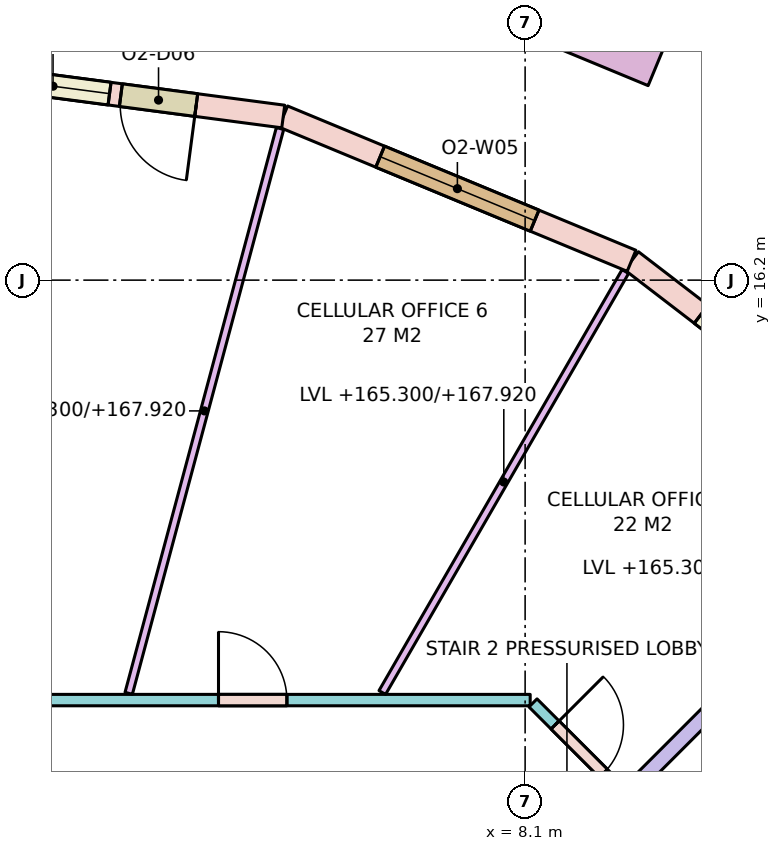
"""IFC4 building model, lengths in metres.
Left out: names, types, materials, properties, quantities, classifications, styles, units other than length and angle.
Written with IfcOpenShell. Run it as: python <this file> out.ifc"""

import sys

from ifc_helpers import new_model, si_unit, direction, frame, frame_2d, origin, place, context, subcontext, project, spatial, rectangle, extrude, element, fill, save


model = new_model("IFC4")
c1 = context("Model", 3, precision=1e-05, world=origin(), true_north=direction((0.0, 1.0)))
c2 = subcontext(c1, "Body", "Model", "MODEL_VIEW")
j1 = project(units=[si_unit("LENGTHUNIT", "METRE"), si_unit("PLANEANGLEUNIT", "RADIAN")], contexts=[c1])
p1 = place(None, origin())
s1 = spatial("IfcSite", under=j1, at=p1, CompositionType="ELEMENT")
p2 = place(p1, origin())
s2 = spatial("IfcBuilding", under=s1, at=p2, CompositionType="ELEMENT")
p3 = place(p2, frame((0.0, 0.0, 165.3)))
s3 = spatial("IfcBuildingStorey", under=s2, at=p3, CompositionType="ELEMENT", Elevation=165.3)
p4 = place(p3, frame((13.435, 13.435, 0.0), z_axis=(0.0, 0.0, 1.0), x_axis=(-0.793348024649, 0.608768356425, 0.0)))
e1 = element("IfcWall", 1, at=p4, inside=s3, PredefinedType="STANDARD", context=c2, shape_type="SweptSolid", body=[
    extrude(rectangle(XDim=4.96, YDim=0.3, at=frame_2d((2.48, 0.0))), origin(), (0.0, 0.0, 1.0), 3.42),
])
p5 = place(p4, frame((1.155, 0.0, 0.0)))
e2 = element("IfcOpeningElement", 2, at=p5, cuts=e1, PredefinedType="OPENING", context=c2, shape_type="SweptSolid", body=[
    extrude(rectangle(XDim=1.0, YDim=2.4, at=frame_2d((0.5, 1.2))), frame((0.0, 0.16, 0.0), z_axis=(0.0, -1.0, 0.0), x_axis=(1.0, 0.0, 0.0)), (0.0, 0.0, 1.0), 0.32),
])
p6 = place(p4, frame((2.305, 0.0, 0.8)))
e3 = element("IfcOpeningElement", 3, at=p6, cuts=e1, PredefinedType="OPENING", context=c2, shape_type="SweptSolid", body=[
    extrude(rectangle(XDim=1.5, YDim=2.4, at=frame_2d((0.75, 1.2))), frame((0.0, 0.16, 0.0), z_axis=(0.0, -1.0, 0.0), x_axis=(1.0, 0.0, 0.0)), (0.0, 0.0, 1.0), 0.32),
])
p7 = place(p3, frame((9.5, 16.455, 0.0), z_axis=(0.0, 0.0, 1.0), x_axis=(-0.923893254961, 0.382650301762, 0.0)))
e4 = element("IfcWall", 4, at=p7, inside=s3, PredefinedType="STANDARD", context=c2, shape_type="SweptSolid", body=[
    extrude(rectangle(XDim=4.96, YDim=0.3, at=frame_2d((2.48, 0.0))), origin(), (0.0, 0.0, 1.0), 3.42),
])
p8 = place(p7, frame((1.38, 0.0, 0.8)))
e5 = element("IfcOpeningElement", 5, at=p8, cuts=e4, PredefinedType="OPENING", context=c2, shape_type="SweptSolid", body=[
    extrude(rectangle(XDim=2.2, YDim=2.4, at=frame_2d((1.1, 1.2))), frame((0.0, 0.16, 0.0), z_axis=(0.0, -1.0, 0.0), x_axis=(1.0, 0.0, 0.0)), (0.0, 0.0, 1.0), 0.32),
])
p9 = place(p3, frame((4.917, 18.353, 0.0), z_axis=(0.0, 0.0, 1.0), x_axis=(-0.991443234469, 0.130538549191, 0.0)))
e6 = element("IfcWall", 6, at=p9, inside=s3, PredefinedType="STANDARD", context=c2, shape_type="SweptSolid", body=[
    extrude(rectangle(XDim=4.96, YDim=0.3, at=frame_2d((2.48, 0.0))), origin(), (0.0, 0.0, 1.0), 3.42),
])
p10 = place(p9, frame((1.155, 0.0, 0.0)))
e7 = element("IfcOpeningElement", 7, at=p10, cuts=e6, PredefinedType="OPENING", context=c2, shape_type="SweptSolid", body=[
    extrude(rectangle(XDim=1.0, YDim=2.4, at=frame_2d((0.5, 1.2))), frame((0.0, 0.16, 0.0), z_axis=(0.0, -1.0, 0.0), x_axis=(1.0, 0.0, 0.0)), (0.0, 0.0, 1.0), 0.32),
])
p11 = place(p9, frame((2.305, 0.0, 0.8)))
e8 = element("IfcOpeningElement", 8, at=p11, cuts=e6, PredefinedType="OPENING", context=c2, shape_type="SweptSolid", body=[
    extrude(rectangle(XDim=1.5, YDim=2.4, at=frame_2d((0.75, 1.2))), frame((0.0, 0.16, 0.0), z_axis=(0.0, -1.0, 0.0), x_axis=(1.0, 0.0, 0.0)), (0.0, 0.0, 1.0), 0.32),
])
p12 = place(p3, frame((9.814, 18.99, 0.0), z_axis=(0.0, 0.0, 1.0), x_axis=(-0.923875488976, 0.382693194178, 0.0)))
e9 = element("IfcWall", 9, at=p12, inside=s3, PredefinedType="PARAPET", context=c2, shape_type="SweptSolid", body=[
    extrude(rectangle(XDim=3.6, YDim=0.5, at=frame_2d((1.8, 0.0))), origin(), (0.0, 0.0, 1.0), 0.9),
])
p13 = place(p3, frame((-8.167, 10.675, 0.0), z_axis=(0.0, 0.0, 1.0), x_axis=(1.0, 0.0, 0.0)))
e10 = element("IfcWall", 10, at=p13, inside=s3, PredefinedType="PARTITIONING", context=c2, shape_type="SweptSolid", body=[
    extrude(rectangle(XDim=16.333, YDim=0.15, at=frame_2d((8.167, 0.0))), origin(), (0.0, 0.0, 1.0), 2.62),
])
p14 = place(p13, frame((4.639, 0.0, 0.0)))
e11 = element("IfcOpeningElement", 11, at=p14, cuts=e10, PredefinedType="OPENING", context=c2, shape_type="SweptSolid", body=[
    extrude(rectangle(XDim=1.8, YDim=2.1, at=frame_2d((0.9, 1.05))), frame((0.0, 0.085, 0.0), z_axis=(0.0, -1.0, 0.0), x_axis=(1.0, 0.0, 0.0)), (0.0, 0.0, 1.0), 0.17),
])
p15 = place(p13, frame((12.232, 0.0, 0.0)))
e12 = element("IfcOpeningElement", 12, at=p15, cuts=e10, PredefinedType="OPENING", context=c2, shape_type="SweptSolid", body=[
    extrude(rectangle(XDim=0.9, YDim=2.1, at=frame_2d((0.45, 1.05))), frame((0.0, 0.085, 0.0), z_axis=(0.0, -1.0, 0.0), x_axis=(1.0, 0.0, 0.0)), (0.0, 0.0, 1.0), 0.17),
])
p16 = place(p3, frame((8.204, 10.638, 0.0), z_axis=(0.0, 0.0, 1.0), x_axis=(0.707177693966, -0.707035861295, 0.0)))
e13 = element("IfcWall", 13, at=p16, inside=s3, PredefinedType="PARTITIONING", context=c2, shape_type="SweptSolid", body=[
    extrude(rectangle(XDim=1.721, YDim=0.15, at=frame_2d((0.861, 0.0))), origin(), (0.0, 0.0, 1.0), 2.62),
])
p17 = place(p16, frame((0.411, 0.0, 0.0)))
e14 = element("IfcOpeningElement", 14, at=p17, cuts=e13, PredefinedType="OPENING", context=c2, shape_type="SweptSolid", body=[
    extrude(rectangle(XDim=0.9, YDim=2.1, at=frame_2d((0.45, 1.05))), frame((0.0, 0.085, 0.0), z_axis=(0.0, -1.0, 0.0), x_axis=(1.0, 0.0, 0.0)), (0.0, 0.0, 1.0), 0.17),
])
p18 = place(p3, frame((9.491, 9.491, 0.0), z_axis=(0.0, 0.0, 1.0), x_axis=(0.707106781187, 0.707106781187, 0.0)))
e15 = element("IfcWall", 15, at=p18, inside=s3, PredefinedType="PARTITIONING", context=c2, shape_type="SweptSolid", body=[
    extrude(rectangle(XDim=5.414, YDim=0.2, at=frame_2d((2.707, 0.0))), origin(), (0.0, 0.0, 1.0), 2.62),
])
p19 = place(p3, frame((6.221, 10.775, 0.0), z_axis=(0.0, 0.0, 1.0), x_axis=(0.500023166934, 0.866012027936, 0.0)))
e16 = element("IfcWall", 16, at=p19, inside=s3, PredefinedType="PARTITIONING", context=c2, shape_type="SweptSolid", body=[
    extrude(rectangle(XDim=6.395, YDim=0.1, at=frame_2d((3.198, 0.0))), origin(), (0.0, 0.0, 1.0), 2.62),
])
p20 = place(p3, frame((2.884, 10.764, 0.0), z_axis=(0.0, 0.0, 1.0), x_axis=(0.25881804804, 0.965926093451, 0.0)))
e17 = element("IfcWall", 17, at=p20, inside=s3, PredefinedType="PARTITIONING", context=c2, shape_type="SweptSolid", body=[
    extrude(rectangle(XDim=7.693, YDim=0.1, at=frame_2d((3.846, 0.0))), origin(), (0.0, 0.0, 1.0), 2.62),
])
p21 = place(p6, origin())
e18 = element("IfcWindow", 18, at=p21, inside=s3, PartitioningType="SINGLE_PANEL", PredefinedType="WINDOW", context=c2, shape_type="SweptSolid", body=[
    extrude(rectangle(XDim=1.5, YDim=2.4, at=frame_2d((0.75, 1.2))), frame((0.0, 0.03, 0.0), z_axis=(0.0, -1.0, 0.0), x_axis=(1.0, 0.0, 0.0)), (0.0, 0.0, 1.0), 0.06),
])
fill(e3, e18)
p22 = place(p8, origin())
e19 = element("IfcWindow", 19, at=p22, inside=s3, PartitioningType="SINGLE_PANEL", PredefinedType="WINDOW", context=c2, shape_type="SweptSolid", body=[
    extrude(rectangle(XDim=2.2, YDim=2.4, at=frame_2d((1.1, 1.2))), frame((0.0, 0.03, 0.0), z_axis=(0.0, -1.0, 0.0), x_axis=(1.0, 0.0, 0.0)), (0.0, 0.0, 1.0), 0.06),
])
fill(e5, e19)
p23 = place(p10, origin())
e20 = element("IfcDoor", 20, at=p23, inside=s3, OperationType="SINGLE_SWING_LEFT", PredefinedType="DOOR", context=c2, shape_type="SweptSolid", body=[
    extrude(rectangle(XDim=1.0, YDim=2.4, at=frame_2d((0.5, 1.2))), frame((0.0, 0.025, 0.0), z_axis=(0.0, -1.0, 0.0), x_axis=(1.0, 0.0, 0.0)), (0.0, 0.0, 1.0), 0.05),
])
fill(e7, e20)
p24 = place(p11, origin())
e21 = element("IfcWindow", 21, at=p24, inside=s3, PartitioningType="SINGLE_PANEL", PredefinedType="WINDOW", context=c2, shape_type="SweptSolid", body=[
    extrude(rectangle(XDim=1.5, YDim=2.4, at=frame_2d((0.75, 1.2))), frame((0.0, 0.03, 0.0), z_axis=(0.0, -1.0, 0.0), x_axis=(1.0, 0.0, 0.0)), (0.0, 0.0, 1.0), 0.06),
])
fill(e8, e21)
p25 = place(p17, origin())
e22 = element("IfcDoor", 22, at=p25, inside=s3, OperationType="SINGLE_SWING_LEFT", PredefinedType="DOOR", context=c2, shape_type="SweptSolid", body=[
    extrude(rectangle(XDim=0.9, YDim=2.1, at=frame_2d((0.45, 1.05))), frame((0.0, 0.025, 0.0), z_axis=(0.0, -1.0, 0.0), x_axis=(1.0, 0.0, 0.0)), (0.0, 0.0, 1.0), 0.05),
])
fill(e14, e22)
p26 = place(p15, origin())
e23 = element("IfcDoor", 23, at=p26, inside=s3, OperationType="SINGLE_SWING_LEFT", PredefinedType="DOOR", context=c2, shape_type="SweptSolid", body=[
    extrude(rectangle(XDim=0.9, YDim=2.1, at=frame_2d((0.45, 1.05))), frame((0.0, 0.025, 0.0), z_axis=(0.0, -1.0, 0.0), x_axis=(1.0, 0.0, 0.0)), (0.0, 0.0, 1.0), 0.05),
])
fill(e12, e23)
save(model, sys.argv[1])
